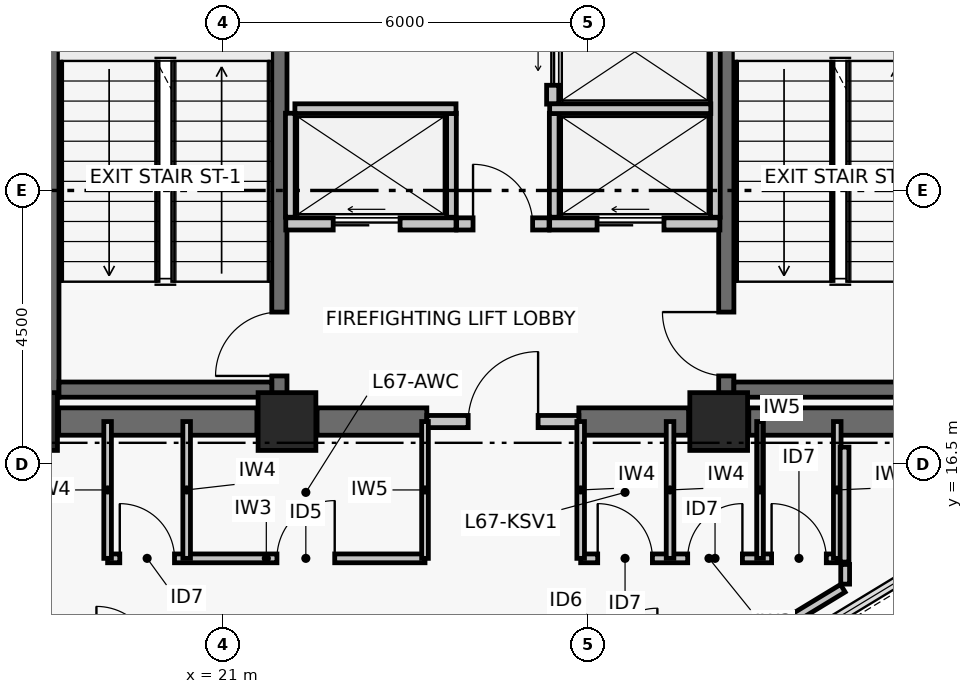
"""IFC4 building model, lengths in metres.
Left out: names, types, materials, properties, quantities, classifications, styles, units other than length and angle.
Written with IfcOpenShell. Run it as: python <this file> out.ifc"""

import sys

from ifc_helpers import new_model, si_unit, direction, frame, frame_2d, origin, origin_2d, place, context, subcontext, project, spatial, rectangle, extrude, element, fill, save


model = new_model("IFC4")
c1 = context("Model", 3, precision=1e-05, world=origin(), true_north=direction((0.0, 1.0)))
c2 = subcontext(c1, "Body", "Model", "MODEL_VIEW")
j1 = project(units=[si_unit("LENGTHUNIT", "METRE"), si_unit("PLANEANGLEUNIT", "RADIAN")], contexts=[c1])
p1 = place(None, origin())
s1 = spatial("IfcSite", under=j1, at=p1, CompositionType="ELEMENT")
p2 = place(p1, origin())
s2 = spatial("IfcBuilding", under=s1, at=p2, CompositionType="ELEMENT")
p3 = place(p2, frame((0.0, 0.0, 265.74)))
s3 = spatial("IfcBuildingStorey", under=s2, at=p3, CompositionType="ELEMENT", Elevation=265.74)
for number, where, z_axis, x_axis in (
    (1, (17.8, 17.2, 0.0), (0.0, 0.0, 1.0), (1.0, 0.0, 0.0)),
    (2, (22.05, 17.2, 0.0), (0.0, 0.0, 1.0), (1.0, 0.0, 0.0)),
    (3, (29.15, 17.2, 0.0), (0.0, 0.0, 1.0), (1.0, 0.0, 0.0)),
):
    element("IfcColumn", number, at=place(p3, frame(where, z_axis=z_axis, x_axis=x_axis)), inside=s3, PredefinedType="COLUMN", context=c2, shape_type="SweptSolid", body=[
        extrude(rectangle(XDim=0.95, YDim=0.95, at=origin_2d()), origin(), (0.0, 0.0, 1.0), 3.72),
    ])
p4 = place(p3, frame((18.295, 17.2, 0.0), z_axis=(0.0, 0.0, 1.0), x_axis=(1.0, 0.0, 0.0)))
e4 = element("IfcWall", 4, at=p4, inside=s3, PredefinedType="SHEAR", context=c2, shape_type="SweptSolid", body=[
    extrude(rectangle(XDim=3.26, YDim=0.45, at=frame_2d((1.63, 0.0))), origin(), (0.0, 0.0, 1.0), 3.5),
])
p5 = place(p3, frame((22.545, 17.2, 0.0), z_axis=(0.0, 0.0, 1.0), x_axis=(1.0, 0.0, 0.0)))
e5 = element("IfcWall", 5, at=p5, inside=s3, PredefinedType="SHEAR", context=c2, shape_type="SweptSolid", body=[
    extrude(rectangle(XDim=1.805, YDim=0.45, at=frame_2d((0.903, 0.0))), origin(), (0.0, 0.0, 1.0), 3.5),
])
p6 = place(p3, frame((26.85, 17.2, 0.0), z_axis=(0.0, 0.0, 1.0), x_axis=(1.0, 0.0, 0.0)))
e6 = element("IfcWall", 6, at=p6, inside=s3, PredefinedType="SHEAR", context=c2, shape_type="SweptSolid", body=[
    extrude(rectangle(XDim=1.805, YDim=0.45, at=frame_2d((0.902, 0.0))), origin(), (0.0, 0.0, 1.0), 3.5),
])
p7 = place(p3, frame((29.645, 17.2, 0.0), z_axis=(0.0, 0.0, 1.0), x_axis=(1.0, 0.0, 0.0)))
e7 = element("IfcWall", 7, at=p7, inside=s3, PredefinedType="SHEAR", context=c2, shape_type="SweptSolid", body=[
    extrude(rectangle(XDim=3.26, YDim=0.45, at=frame_2d((1.63, 0.0))), origin(), (0.0, 0.0, 1.0), 3.5),
])
p8 = place(p3, frame((18.175, 17.6, 0.0), z_axis=(0.0, 0.0, 1.0), x_axis=(0.0, 1.0, 0.0)))
e8 = element("IfcWall", 8, at=p8, inside=s3, PredefinedType="SHEAR", context=c2, shape_type="SweptSolid", body=[
    extrude(rectangle(XDim=8.8, YDim=0.25, at=frame_2d((4.4, 0.0))), origin(), (0.0, 0.0, 1.0), 3.5),
])
p9 = place(p3, frame((21.925, 17.6, 0.0), z_axis=(0.0, 0.0, 1.0), x_axis=(0.0, 1.0, 0.0)))
e9 = element("IfcWall", 9, at=p9, inside=s3, PredefinedType="SHEAR", context=c2, shape_type="SweptSolid", body=[
    extrude(rectangle(XDim=8.8, YDim=0.25, at=frame_2d((4.4, 0.0))), origin(), (0.0, 0.0, 1.0), 3.5),
])
p10 = place(p9, frame((0.35, 0.0, 0.0)))
e10 = element("IfcOpeningElement", 10, at=p10, cuts=e9, PredefinedType="OPENING", context=c2, shape_type="SweptSolid", body=[
    extrude(rectangle(XDim=1.05, YDim=2.08, at=frame_2d((0.525, 1.04))), frame((0.0, 0.135, 0.0), z_axis=(0.0, -1.0, 0.0), x_axis=(1.0, 0.0, 0.0)), (0.0, 0.0, 1.0), 0.27),
])
p11 = place(p3, frame((18.3, 17.725, 0.0), z_axis=(0.0, 0.0, 1.0), x_axis=(1.0, 0.0, 0.0)))
e11 = element("IfcWall", 11, at=p11, inside=s3, PredefinedType="SHEAR", context=c2, shape_type="SweptSolid", body=[
    extrude(rectangle(XDim=3.5, YDim=0.25, at=frame_2d((1.75, 0.0))), origin(), (0.0, 0.0, 1.0), 3.5),
])
p12 = place(p3, frame((29.275, 17.6, 0.0), z_axis=(0.0, 0.0, 1.0), x_axis=(0.0, 1.0, 0.0)))
e12 = element("IfcWall", 12, at=p12, inside=s3, PredefinedType="SHEAR", context=c2, shape_type="SweptSolid", body=[
    extrude(rectangle(XDim=8.8, YDim=0.25, at=frame_2d((4.4, 0.0))), origin(), (0.0, 0.0, 1.0), 3.5),
])
p13 = place(p12, frame((0.35, 0.0, 0.0)))
e13 = element("IfcOpeningElement", 13, at=p13, cuts=e12, PredefinedType="OPENING", context=c2, shape_type="SweptSolid", body=[
    extrude(rectangle(XDim=1.05, YDim=2.08, at=frame_2d((0.525, 1.04))), frame((0.0, 0.135, 0.0), z_axis=(0.0, -1.0, 0.0), x_axis=(1.0, 0.0, 0.0)), (0.0, 0.0, 1.0), 0.27),
])
p14 = place(p3, frame((29.4, 17.725, 0.0), z_axis=(0.0, 0.0, 1.0), x_axis=(1.0, 0.0, 0.0)))
e14 = element("IfcWall", 14, at=p14, inside=s3, PredefinedType="SHEAR", context=c2, shape_type="SweptSolid", body=[
    extrude(rectangle(XDim=3.5, YDim=0.25, at=frame_2d((1.75, 0.0))), origin(), (0.0, 0.0, 1.0), 3.5),
])
p15 = place(p3, frame((24.35, 17.2, 0.0), z_axis=(0.0, 0.0, 1.0), x_axis=(1.0, 0.0, 0.0)))
e15 = element("IfcWall", 15, at=p15, inside=s3, PredefinedType="PARTITIONING", context=c2, shape_type="SweptSolid", body=[
    extrude(rectangle(XDim=2.5, YDim=0.2, at=frame_2d((1.25, 0.0))), origin(), (0.0, 0.0, 1.0), 2.63),
])
p16 = place(p15, frame((0.68, 0.0, 0.0)))
e16 = element("IfcOpeningElement", 16, at=p16, cuts=e15, PredefinedType="OPENING", context=c2, shape_type="SweptSolid", body=[
    extrude(rectangle(XDim=1.15, YDim=2.08, at=frame_2d((0.575, 1.04))), frame((0.0, 0.11, 0.0), z_axis=(0.0, -1.0, 0.0), x_axis=(1.0, 0.0, 0.0)), (0.0, 0.0, 1.0), 0.22),
])
p17 = place(p3, frame((24.84, 20.45, 0.0), z_axis=(0.0, 0.0, 1.0), x_axis=(1.0, 0.0, 0.0)))
e17 = element("IfcWall", 17, at=p17, inside=s3, PredefinedType="PARTITIONING", context=c2, shape_type="SweptSolid", body=[
    extrude(rectangle(XDim=1.52, YDim=0.2, at=frame_2d((0.76, 0.0))), origin(), (0.0, 0.0, 1.0), 3.5),
])
p18 = place(p17, frame((0.27, 0.0, 0.0)))
e18 = element("IfcOpeningElement", 18, at=p18, cuts=e17, PredefinedType="OPENING", context=c2, shape_type="SweptSolid", body=[
    extrude(rectangle(XDim=0.98, YDim=2.06, at=frame_2d((0.49, 1.03))), frame((0.0, 0.11, 0.0), z_axis=(0.0, -1.0, 0.0), x_axis=(1.0, 0.0, 0.0)), (0.0, 0.0, 1.0), 0.22),
])
p19 = place(p3, frame((22.03, 20.45, 0.0), z_axis=(0.0, 0.0, 1.0), x_axis=(1.0, 0.0, 0.0)))
e19 = element("IfcWall", 19, at=p19, inside=s3, PredefinedType="PARTITIONING", context=c2, shape_type="SweptSolid", body=[
    extrude(rectangle(XDim=2.8, YDim=0.2, at=frame_2d((1.4, 0.0))), origin(), (0.0, 0.0, 1.0), 3.5),
])
p20 = place(p19, frame((0.78, 0.0, 0.0)))
e20 = element("IfcOpeningElement", 20, at=p20, cuts=e19, PredefinedType="OPENING", context=c2, shape_type="SweptSolid", body=[
    extrude(rectangle(XDim=1.1, YDim=2.08, at=frame_2d((0.55, 1.04))), frame((0.0, 0.11, 0.0), z_axis=(0.0, -1.0, 0.0), x_axis=(1.0, 0.0, 0.0)), (0.0, 0.0, 1.0), 0.22),
])
p21 = place(p3, frame((26.37, 20.45, 0.0), z_axis=(0.0, 0.0, 1.0), x_axis=(1.0, 0.0, 0.0)))
e21 = element("IfcWall", 21, at=p21, inside=s3, PredefinedType="PARTITIONING", context=c2, shape_type="SweptSolid", body=[
    extrude(rectangle(XDim=2.8, YDim=0.2, at=frame_2d((1.4, 0.0))), origin(), (0.0, 0.0, 1.0), 3.5),
])
p22 = place(p21, frame((0.78, 0.0, 0.0)))
e22 = element("IfcOpeningElement", 22, at=p22, cuts=e21, PredefinedType="OPENING", context=c2, shape_type="SweptSolid", body=[
    extrude(rectangle(XDim=1.1, YDim=2.08, at=frame_2d((0.55, 1.04))), frame((0.0, 0.11, 0.0), z_axis=(0.0, -1.0, 0.0), x_axis=(1.0, 0.0, 0.0)), (0.0, 0.0, 1.0), 0.22),
])
p23 = place(p3, frame((26.42, 22.42, 0.0), z_axis=(0.0, 0.0, 1.0), x_axis=(0.0, 1.0, 0.0)))
e23 = element("IfcWall", 23, at=p23, inside=s3, PredefinedType="PARTITIONING", context=c2, shape_type="SweptSolid", body=[
    extrude(rectangle(XDim=1.72, YDim=0.2, at=frame_2d((0.86, 0.0))), origin(), (0.0, 0.0, 1.0), 3.5),
])
p24 = place(p23, frame((0.31, 0.0, 0.0)))
e24 = element("IfcOpeningElement", 24, at=p24, cuts=e23, PredefinedType="OPENING", context=c2, shape_type="SweptSolid", body=[
    extrude(rectangle(XDim=1.1, YDim=2.08, at=frame_2d((0.55, 1.04))), frame((0.0, 0.11, 0.0), z_axis=(0.0, -1.0, 0.0), x_axis=(1.0, 0.0, 0.0)), (0.0, 0.0, 1.0), 0.22),
])
for number, where, z_axis, x_axis in (
    (25, (22.105, 20.56, 0.0), (0.0, 0.0, 1.0), (0.0, 1.0, 0.0)),
    (26, (24.755, 20.56, 0.0), (0.0, 0.0, 1.0), (0.0, 1.0, 0.0)),
):
    element("IfcWall", number, at=place(p3, frame(where, z_axis=z_axis, x_axis=x_axis)), inside=s3, PredefinedType="PARTITIONING", context=c2, shape_type="SweptSolid", body=[
        extrude(rectangle(XDim=1.71, YDim=0.16, at=frame_2d((0.855, 0.0))), origin(), (0.0, 0.0, 1.0), 3.5),
    ])
p25 = place(p3, frame((22.18, 22.345, 0.0), z_axis=(0.0, 0.0, 1.0), x_axis=(1.0, 0.0, 0.0)))
e27 = element("IfcWall", 27, at=p25, inside=s3, PredefinedType="PARTITIONING", context=c2, shape_type="SweptSolid", body=[
    extrude(rectangle(XDim=2.65, YDim=0.16, at=frame_2d((1.325, 0.0))), origin(), (0.0, 0.0, 1.0), 3.5),
])
p26 = place(p3, frame((29.095, 20.56, 0.0), z_axis=(0.0, 0.0, 1.0), x_axis=(0.0, 1.0, 0.0)))
e28 = element("IfcWall", 28, at=p26, inside=s3, PredefinedType="PARTITIONING", context=c2, shape_type="SweptSolid", body=[
    extrude(rectangle(XDim=3.58, YDim=0.16, at=frame_2d((1.79, 0.0))), origin(), (0.0, 0.0, 1.0), 3.5),
])
p27 = place(p3, frame((26.445, 20.56, 0.0), z_axis=(0.0, 0.0, 1.0), x_axis=(0.0, 1.0, 0.0)))
e29 = element("IfcWall", 29, at=p27, inside=s3, PredefinedType="PARTITIONING", context=c2, shape_type="SweptSolid", body=[
    extrude(rectangle(XDim=1.71, YDim=0.16, at=frame_2d((0.855, 0.0))), origin(), (0.0, 0.0, 1.0), 3.5),
])
p28 = place(p3, frame((26.37, 22.345, 0.0), z_axis=(0.0, 0.0, 1.0), x_axis=(1.0, 0.0, 0.0)))
e30 = element("IfcWall", 30, at=p28, inside=s3, PredefinedType="PARTITIONING", context=c2, shape_type="SweptSolid", body=[
    extrude(rectangle(XDim=2.65, YDim=0.16, at=frame_2d((1.325, 0.0))), origin(), (0.0, 0.0, 1.0), 3.5),
])
p29 = place(p3, frame((19.1, 14.95, 0.0), z_axis=(0.0, 0.0, 1.0), x_axis=(1.0, 0.0, 0.0)))
e31 = element("IfcWall", 31, at=p29, inside=s3, PredefinedType="PARTITIONING", context=c2, shape_type="SweptSolid", body=[
    extrude(rectangle(XDim=5.22, YDim=0.145, at=frame_2d((2.61, 0.0))), origin(), (0.0, 0.0, 1.0), 2.78),
])
p30 = place(p29, frame((0.2, 0.0, 0.0)))
e32 = element("IfcOpeningElement", 32, at=p30, cuts=e31, PredefinedType="OPENING", context=c2, shape_type="SweptSolid", body=[
    extrude(rectangle(XDim=0.9, YDim=2.02, at=frame_2d((0.45, 1.01))), frame((0.0, 0.083, 0.0), z_axis=(0.0, -1.0, 0.0), x_axis=(1.0, 0.0, 0.0)), (0.0, 0.0, 1.0), 0.165),
])
p31 = place(p29, frame((2.785, 0.0, 0.0)))
e33 = element("IfcOpeningElement", 33, at=p31, cuts=e31, PredefinedType="OPENING", context=c2, shape_type="SweptSolid", body=[
    extrude(rectangle(XDim=0.95, YDim=2.06, at=frame_2d((0.475, 1.03))), frame((0.0, 0.083, 0.0), z_axis=(0.0, -1.0, 0.0), x_axis=(1.0, 0.0, 0.0)), (0.0, 0.0, 1.0), 0.165),
])
p32 = place(p3, frame((26.88, 14.95, 0.0), z_axis=(0.0, 0.0, 1.0), x_axis=(1.0, 0.0, 0.0)))
e34 = element("IfcWall", 34, at=p32, inside=s3, PredefinedType="PARTITIONING", context=c2, shape_type="SweptSolid", body=[
    extrude(rectangle(XDim=4.22, YDim=0.145, at=frame_2d((2.11, 0.0))), origin(), (0.0, 0.0, 1.0), 2.98),
])
p33 = place(p32, frame((0.28, 0.0, 0.0)))
e35 = element("IfcOpeningElement", 35, at=p33, cuts=e34, PredefinedType="OPENING", context=c2, shape_type="SweptSolid", body=[
    extrude(rectangle(XDim=0.9, YDim=2.02, at=frame_2d((0.45, 1.01))), frame((0.0, 0.083, 0.0), z_axis=(0.0, -1.0, 0.0), x_axis=(1.0, 0.0, 0.0)), (0.0, 0.0, 1.0), 0.165),
])
p34 = place(p32, frame((1.76, 0.0, 0.0)))
e36 = element("IfcOpeningElement", 36, at=p34, cuts=e34, PredefinedType="OPENING", context=c2, shape_type="SweptSolid", body=[
    extrude(rectangle(XDim=0.9, YDim=2.02, at=frame_2d((0.45, 1.01))), frame((0.0, 0.083, 0.0), z_axis=(0.0, -1.0, 0.0), x_axis=(1.0, 0.0, 0.0)), (0.0, 0.0, 1.0), 0.165),
])
p35 = place(p32, frame((3.14, 0.0, 0.0)))
e37 = element("IfcOpeningElement", 37, at=p35, cuts=e34, PredefinedType="OPENING", context=c2, shape_type="SweptSolid", body=[
    extrude(rectangle(XDim=0.9, YDim=2.02, at=frame_2d((0.45, 1.01))), frame((0.0, 0.083, 0.0), z_axis=(0.0, -1.0, 0.0), x_axis=(1.0, 0.0, 0.0)), (0.0, 0.0, 1.0), 0.165),
])
for number, where, z_axis, x_axis in (
    (38, (19.1, 14.95, 0.0), (0.0, 0.0, 1.0), (0.0, 1.0, 0.0)),
    (39, (20.4, 14.95, 0.0), (0.0, 0.0, 1.0), (0.0, 1.0, 0.0)),
):
    element("IfcWall", number, at=place(p3, frame(where, z_axis=z_axis, x_axis=x_axis)), inside=s3, PredefinedType="PARTITIONING", context=c2, shape_type="SweptSolid", body=[
        extrude(rectangle(XDim=2.25, YDim=0.125, at=frame_2d((1.125, 0.0))), origin(), (0.0, 0.0, 1.0), 2.63),
    ])
p36 = place(p3, frame((24.32, 14.95, 0.0), z_axis=(0.0, 0.0, 1.0), x_axis=(0.0, 1.0, 0.0)))
e40 = element("IfcWall", 40, at=p36, inside=s3, PredefinedType="PARTITIONING", context=c2, shape_type="SweptSolid", body=[
    extrude(rectangle(XDim=2.25, YDim=0.11, at=frame_2d((1.125, 0.0))), origin(), (0.0, 0.0, 1.0), 2.63),
])
for number, where, z_axis, x_axis in (
    (41, (26.88, 14.95, 0.0), (0.0, 0.0, 1.0), (0.0, 1.0, 0.0)),
    (42, (28.35, 14.95, 0.0), (0.0, 0.0, 1.0), (0.0, 1.0, 0.0)),
):
    element("IfcWall", number, at=place(p3, frame(where, z_axis=z_axis, x_axis=x_axis)), inside=s3, PredefinedType="PARTITIONING", context=c2, shape_type="SweptSolid", body=[
        extrude(rectangle(XDim=2.25, YDim=0.125, at=frame_2d((1.125, 0.0))), origin(), (0.0, 0.0, 1.0), 2.63),
    ])
p37 = place(p3, frame((29.83, 14.95, 0.0), z_axis=(0.0, 0.0, 1.0), x_axis=(0.0, 1.0, 0.0)))
e43 = element("IfcWall", 43, at=p37, inside=s3, PredefinedType="PARTITIONING", context=c2, shape_type="SweptSolid", body=[
    extrude(rectangle(XDim=2.25, YDim=0.11, at=frame_2d((1.125, 0.0))), origin(), (0.0, 0.0, 1.0), 2.63),
])
p38 = place(p3, frame((31.1, 14.95, 0.0), z_axis=(0.0, 0.0, 1.0), x_axis=(0.0, 1.0, 0.0)))
e44 = element("IfcWall", 44, at=p38, inside=s3, PredefinedType="PARTITIONING", context=c2, shape_type="SweptSolid", body=[
    extrude(rectangle(XDim=2.25, YDim=0.125, at=frame_2d((1.125, 0.0))), origin(), (0.0, 0.0, 1.0), 2.63),
])
p39 = place(p3, frame((29.168, 13.229, 0.0), z_axis=(0.0, 0.0, 1.0), x_axis=(0.854678044033, 0.519158396876, 0.0)))
e45 = element("IfcWall", 45, at=p39, inside=s3, PredefinedType="PARTITIONING", context=c2, shape_type="SweptSolid", body=[
    extrude(rectangle(XDim=2.368, YDim=0.145, at=frame_2d((1.184, 0.0))), origin(), (0.0, 0.0, 1.0), 3.5),
])
p40 = place(p3, frame((31.23, 14.526, 0.0), z_axis=(0.0, 0.0, 1.0), x_axis=(0.0, 1.0, 0.0)))
e46 = element("IfcWall", 46, at=p40, inside=s3, PredefinedType="PARTITIONING", context=c2, shape_type="SweptSolid", body=[
    extrude(rectangle(XDim=0.324, YDim=0.145, at=frame_2d((0.162, 0.0))), origin(), (0.0, 0.0, 1.0), 3.5),
])
p41 = place(p3, frame((31.22, 14.889, 0.0), z_axis=(0.0, 0.0, 1.0), x_axis=(0.0, 1.0, 0.0)))
e47 = element("IfcWall", 47, at=p41, inside=s3, PredefinedType="PARTITIONING", context=c2, shape_type="SweptSolid", body=[
    extrude(rectangle(XDim=1.891, YDim=0.145, at=frame_2d((0.946, 0.0))), origin(), (0.0, 0.0, 1.0), 2.63),
])
p42 = place(p10, origin())
e48 = element("IfcDoor", 48, at=p42, inside=s3, OperationType="SINGLE_SWING_LEFT", PredefinedType="DOOR", context=c2, shape_type="SweptSolid", body=[
    extrude(rectangle(XDim=1.05, YDim=2.08, at=frame_2d((0.525, 1.04))), frame((0.0, 0.025, 0.0), z_axis=(0.0, -1.0, 0.0), x_axis=(1.0, 0.0, 0.0)), (0.0, 0.0, 1.0), 0.05),
])
fill(e10, e48)
p43 = place(p13, origin())
e49 = element("IfcDoor", 49, at=p43, inside=s3, OperationType="SINGLE_SWING_RIGHT", PredefinedType="DOOR", context=c2, shape_type="SweptSolid", body=[
    extrude(rectangle(XDim=1.05, YDim=2.08, at=frame_2d((0.525, 1.04))), frame((0.0, 0.025, 0.0), z_axis=(0.0, -1.0, 0.0), x_axis=(1.0, 0.0, 0.0)), (0.0, 0.0, 1.0), 0.05),
])
fill(e13, e49)
p44 = place(p16, origin())
e50 = element("IfcDoor", 50, at=p44, inside=s3, OperationType="SINGLE_SWING_RIGHT", PredefinedType="DOOR", context=c2, shape_type="SweptSolid", body=[
    extrude(rectangle(XDim=1.15, YDim=2.08, at=frame_2d((0.575, 1.04))), frame((0.0, 0.025, 0.0), z_axis=(0.0, -1.0, 0.0), x_axis=(1.0, 0.0, 0.0)), (0.0, 0.0, 1.0), 0.05),
])
fill(e16, e50)
p45 = place(p18, origin())
e51 = element("IfcDoor", 51, at=p45, inside=s3, OperationType="SINGLE_SWING_LEFT", PredefinedType="DOOR", context=c2, shape_type="SweptSolid", body=[
    extrude(rectangle(XDim=0.98, YDim=2.06, at=frame_2d((0.49, 1.03))), frame((0.0, 0.025, 0.0), z_axis=(0.0, -1.0, 0.0), x_axis=(1.0, 0.0, 0.0)), (0.0, 0.0, 1.0), 0.05),
])
fill(e18, e51)
p46 = place(p20, origin())
e52 = element("IfcDoor", 52, at=p46, inside=s3, OperationType="DOUBLE_DOOR_SLIDING", PredefinedType="DOOR", context=c2, shape_type="SweptSolid", body=[
    extrude(rectangle(XDim=1.1, YDim=2.08, at=frame_2d((0.55, 1.04))), frame((0.0, 0.025, 0.0), z_axis=(0.0, -1.0, 0.0), x_axis=(1.0, 0.0, 0.0)), (0.0, 0.0, 1.0), 0.05),
])
fill(e20, e52)
p47 = place(p22, origin())
e53 = element("IfcDoor", 53, at=p47, inside=s3, OperationType="DOUBLE_DOOR_SLIDING", PredefinedType="DOOR", context=c2, shape_type="SweptSolid", body=[
    extrude(rectangle(XDim=1.1, YDim=2.08, at=frame_2d((0.55, 1.04))), frame((0.0, 0.025, 0.0), z_axis=(0.0, -1.0, 0.0), x_axis=(1.0, 0.0, 0.0)), (0.0, 0.0, 1.0), 0.05),
])
fill(e22, e53)
p48 = place(p24, origin())
e54 = element("IfcDoor", 54, at=p48, inside=s3, OperationType="DOUBLE_DOOR_SLIDING", PredefinedType="DOOR", context=c2, shape_type="SweptSolid", body=[
    extrude(rectangle(XDim=1.1, YDim=2.08, at=frame_2d((0.55, 1.04))), frame((0.0, 0.025, 0.0), z_axis=(0.0, -1.0, 0.0), x_axis=(1.0, 0.0, 0.0)), (0.0, 0.0, 1.0), 0.05),
])
fill(e24, e54)
p49 = place(p30, origin())
e55 = element("IfcDoor", 55, at=p49, inside=s3, OperationType="SINGLE_SWING_LEFT", PredefinedType="DOOR", context=c2, shape_type="SweptSolid", body=[
    extrude(rectangle(XDim=0.9, YDim=2.02, at=frame_2d((0.45, 1.01))), frame((0.0, 0.025, 0.0), z_axis=(0.0, -1.0, 0.0), x_axis=(1.0, 0.0, 0.0)), (0.0, 0.0, 1.0), 0.05),
])
fill(e32, e55)
p50 = place(p31, origin())
e56 = element("IfcDoor", 56, at=p50, inside=s3, OperationType="SINGLE_SWING_RIGHT", PredefinedType="DOOR", context=c2, shape_type="SweptSolid", body=[
    extrude(rectangle(XDim=0.95, YDim=2.06, at=frame_2d((0.475, 1.03))), frame((0.0, 0.025, 0.0), z_axis=(0.0, -1.0, 0.0), x_axis=(1.0, 0.0, 0.0)), (0.0, 0.0, 1.0), 0.05),
])
fill(e33, e56)
p51 = place(p33, origin())
e57 = element("IfcDoor", 57, at=p51, inside=s3, OperationType="SINGLE_SWING_LEFT", PredefinedType="DOOR", context=c2, shape_type="SweptSolid", body=[
    extrude(rectangle(XDim=0.9, YDim=2.02, at=frame_2d((0.45, 1.01))), frame((0.0, 0.025, 0.0), z_axis=(0.0, -1.0, 0.0), x_axis=(1.0, 0.0, 0.0)), (0.0, 0.0, 1.0), 0.05),
])
fill(e35, e57)
p52 = place(p34, origin())
e58 = element("IfcDoor", 58, at=p52, inside=s3, OperationType="SINGLE_SWING_RIGHT", PredefinedType="DOOR", context=c2, shape_type="SweptSolid", body=[
    extrude(rectangle(XDim=0.9, YDim=2.02, at=frame_2d((0.45, 1.01))), frame((0.0, 0.025, 0.0), z_axis=(0.0, -1.0, 0.0), x_axis=(1.0, 0.0, 0.0)), (0.0, 0.0, 1.0), 0.05),
])
fill(e36, e58)
p53 = place(p35, origin())
e59 = element("IfcDoor", 59, at=p53, inside=s3, OperationType="SINGLE_SWING_LEFT", PredefinedType="DOOR", context=c2, shape_type="SweptSolid", body=[
    extrude(rectangle(XDim=0.9, YDim=2.02, at=frame_2d((0.45, 1.01))), frame((0.0, 0.025, 0.0), z_axis=(0.0, -1.0, 0.0), x_axis=(1.0, 0.0, 0.0)), (0.0, 0.0, 1.0), 0.05),
])
fill(e37, e59)
save(model, sys.argv[1])
